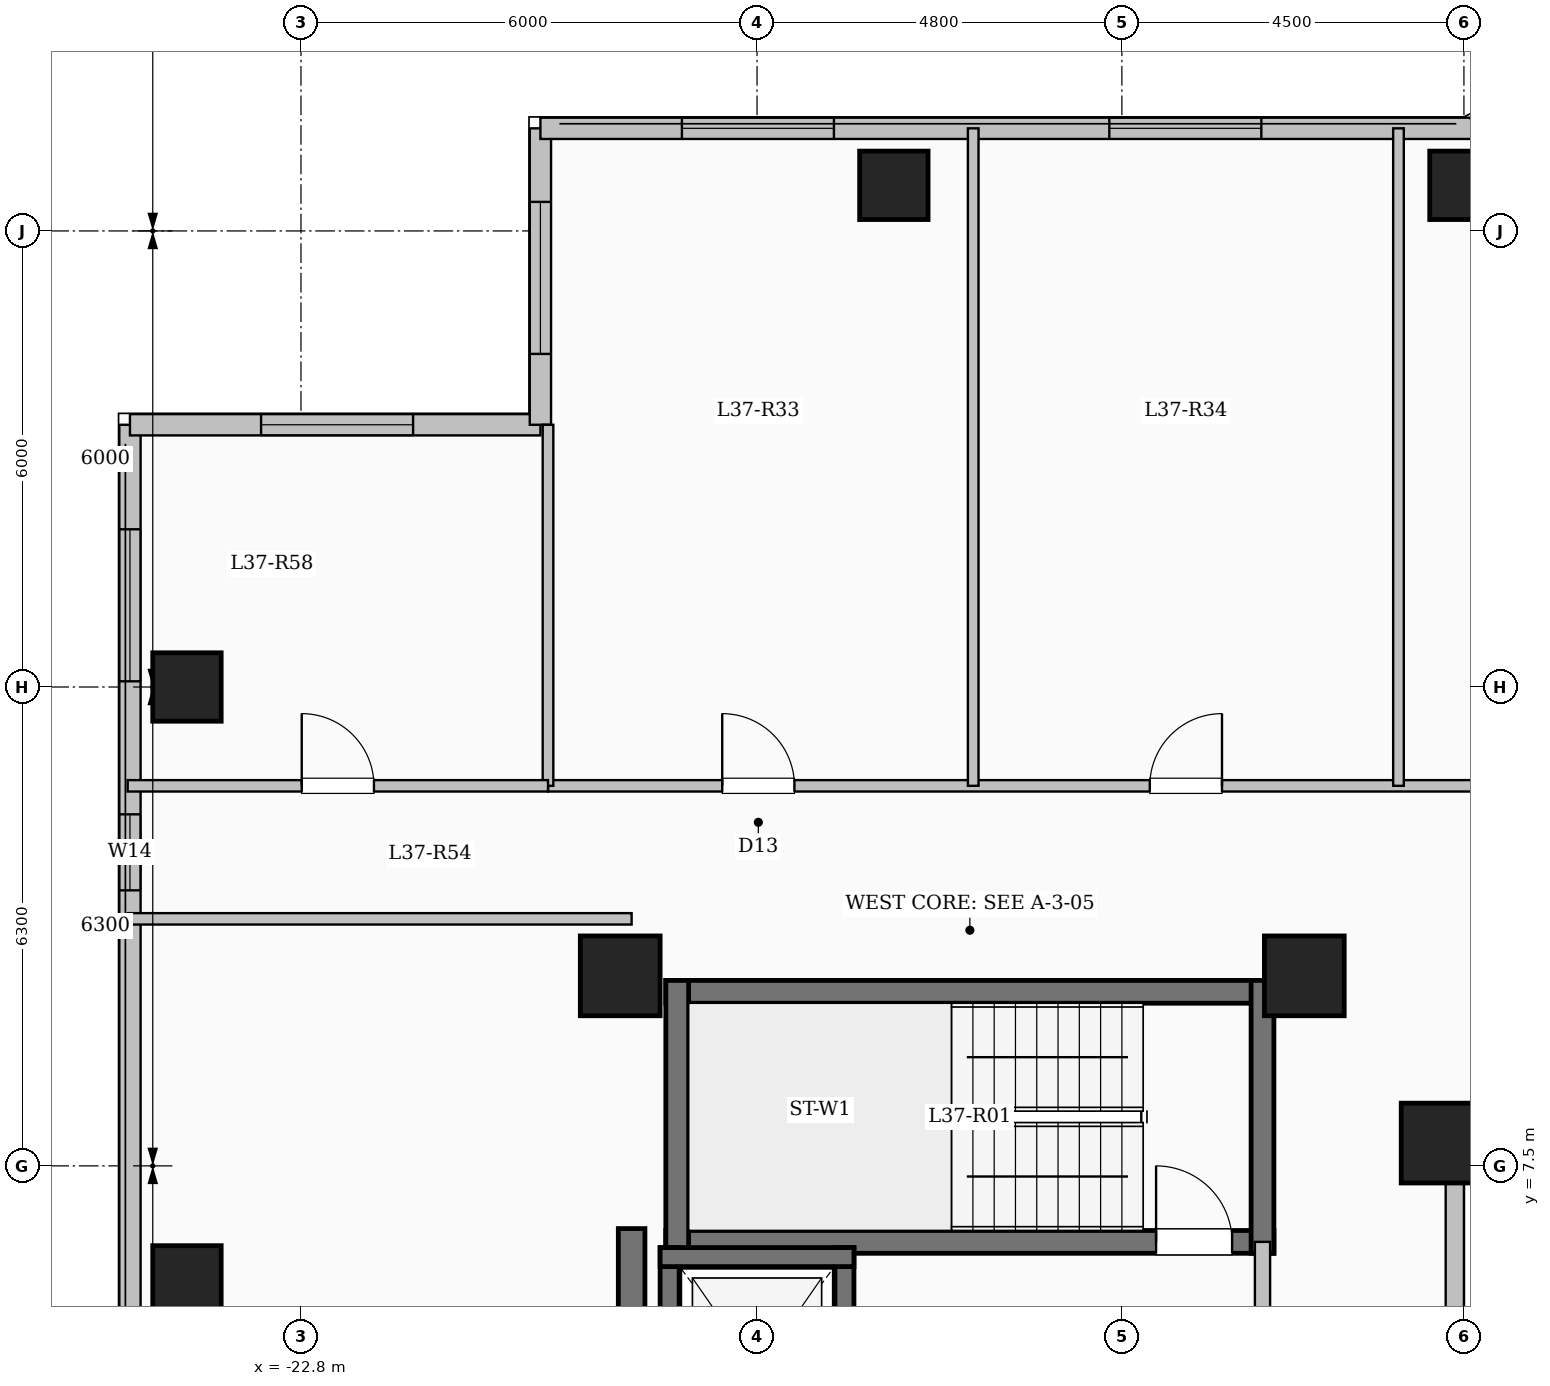
"""IFC4 building model, lengths in metres.
Left out: names, types, materials, properties, quantities, classifications, styles, units other than length and angle.
Written with IfcOpenShell. Run it as: python <this file> out.ifc"""

import sys

from ifc_helpers import new_model, si_unit, direction, frame, frame_2d, origin, origin_2d, place, context, subcontext, project, spatial, rectangle, extrude, element, fill, save


model = new_model("IFC4")
c1 = context("Model", 3, precision=1e-05, world=origin(), true_north=direction((0.0, 1.0)))
c2 = subcontext(c1, "Body", "Model", "MODEL_VIEW")
j1 = project(units=[si_unit("LENGTHUNIT", "METRE"), si_unit("PLANEANGLEUNIT", "RADIAN")], contexts=[c1])
p1 = place(None, origin())
s1 = spatial("IfcSite", under=j1, at=p1, CompositionType="ELEMENT")
p2 = place(p1, origin())
s2 = spatial("IfcBuilding", under=s1, at=p2, CompositionType="ELEMENT")
p3 = place(p2, frame((0.0, 0.0, 139.3)))
s3 = spatial("IfcBuildingStorey", under=s2, at=p3, CompositionType="ELEMENT", Elevation=139.3)
for number, where, z_axis, x_axis in (
    (1, (-7.8, 7.8, 0.0), (0.0, 0.0, 1.0), (1.0, 0.0, 0.0)),
    (2, (-9.6, 10.0, 0.0), (0.0, 0.0, 1.0), (1.0, 0.0, 0.0)),
    (3, (-18.6, 10.0, 0.0), (0.0, 0.0, 1.0), (1.0, 0.0, 0.0)),
):
    element("IfcColumn", number, at=place(p3, frame(where, z_axis=z_axis, x_axis=x_axis)), inside=s3, PredefinedType="COLUMN", context=c2, shape_type="SweptSolid", body=[
        extrude(rectangle(XDim=1.05, YDim=1.05, at=origin_2d()), origin(), (0.0, 0.0, 1.0), 3.35),
    ])
for number, where, z_axis, x_axis in (
    (4, (-15.0, 20.4, 0.0), (0.0, 0.0, 1.0), (1.0, 0.0, 0.0)),
    (5, (-7.5, 20.4, 0.0), (0.0, 0.0, 1.0), (1.0, 0.0, 0.0)),
    (6, (-24.3, 6.0, 0.0), (0.0, 0.0, 1.0), (1.0, 0.0, 0.0)),
    (7, (-24.3, 13.8, 0.0), (0.0, 0.0, 1.0), (1.0, 0.0, 0.0)),
):
    element("IfcColumn", number, at=place(p3, frame(where, z_axis=z_axis, x_axis=x_axis)), inside=s3, PredefinedType="COLUMN", context=c2, shape_type="SweptSolid", body=[
        extrude(rectangle(XDim=0.9, YDim=0.9, at=origin_2d()), origin(), (0.0, 0.0, 1.0), 3.35),
    ])
p4 = place(p3, frame((7.62, 7.62, 0.0), z_axis=(0.0, 0.0, 1.0), x_axis=(-1.0, 0.0, 0.0)))
e8 = element("IfcWall", 8, at=p4, inside=s3, PredefinedType="SOLIDWALL", context=c2, shape_type="SweptSolid", body=[
    extrude(rectangle(XDim=15.24, YDim=0.24, at=frame_2d((7.62, 0.0))), origin(), (0.0, 0.0, 1.0), 3.1),
])
p5 = place(p4, frame((6.92, 0.0, 0.95)))
e9 = element("IfcOpeningElement", 9, at=p5, cuts=e8, PredefinedType="OPENING", context=c2, shape_type="SweptSolid", body=[
    extrude(rectangle(XDim=1.4, YDim=1.5, at=frame_2d((0.7, 0.75))), frame((0.0, 0.13, 0.0), z_axis=(0.0, -1.0, 0.0), x_axis=(1.0, 0.0, 0.0)), (0.0, 0.0, 1.0), 0.26),
])
p6 = place(p3, frame((-7.62, 7.62, 0.0), z_axis=(0.0, 0.0, 1.0), x_axis=(0.0, -1.0, 0.0)))
e10 = element("IfcWall", 10, at=p6, inside=s3, PredefinedType="SOLIDWALL", context=c2, shape_type="SweptSolid", body=[
    extrude(rectangle(XDim=15.24, YDim=0.24, at=frame_2d((7.62, 0.0))), origin(), (0.0, 0.0, 1.0), 3.1),
])
p7 = place(p6, frame((6.92, 0.0, 0.95)))
e11 = element("IfcOpeningElement", 11, at=p7, cuts=e10, PredefinedType="OPENING", context=c2, shape_type="SweptSolid", body=[
    extrude(rectangle(XDim=1.4, YDim=1.5, at=frame_2d((0.7, 0.75))), frame((0.0, 0.13, 0.0), z_axis=(0.0, -1.0, 0.0), x_axis=(1.0, 0.0, 0.0)), (0.0, 0.0, 1.0), 0.26),
])
p8 = place(p3, frame((-25.05, -17.25, 0.0), z_axis=(0.0, 0.0, 1.0), x_axis=(0.0, 1.0, 0.0)))
e12 = element("IfcWall", 12, at=p8, inside=s3, PredefinedType="SOLIDWALL", context=c2, shape_type="SweptSolid", body=[
    extrude(rectangle(XDim=34.5, YDim=0.28, at=frame_2d((17.25, 0.0))), origin(), (0.0, 0.0, 1.0), 3.1),
])
p9 = place(p8, frame((2.35, 0.0, 0.9)))
e13 = element("IfcOpeningElement", 13, at=p9, cuts=e12, PredefinedType="OPENING", context=c2, shape_type="SweptSolid", body=[
    extrude(rectangle(XDim=2.2, YDim=1.75, at=frame_2d((1.1, 0.875))), frame((0.0, 0.15, 0.0), z_axis=(0.0, -1.0, 0.0), x_axis=(1.0, 0.0, 0.0)), (0.0, 0.0, 1.0), 0.3),
])
p10 = place(p8, frame((7.742, 0.0, 0.9)))
e14 = element("IfcOpeningElement", 14, at=p10, cuts=e12, PredefinedType="OPENING", context=c2, shape_type="SweptSolid", body=[
    extrude(rectangle(XDim=1.5, YDim=1.65, at=frame_2d((0.75, 0.825))), frame((0.0, 0.15, 0.0), z_axis=(0.0, -1.0, 0.0), x_axis=(1.0, 0.0, 0.0)), (0.0, 0.0, 1.0), 0.3),
])
p11 = place(p8, frame((18.0, 0.0, 0.9)))
e15 = element("IfcOpeningElement", 15, at=p11, cuts=e12, PredefinedType="OPENING", context=c2, shape_type="SweptSolid", body=[
    extrude(rectangle(XDim=2.0, YDim=1.7, at=frame_2d((1.0, 0.85))), frame((0.0, 0.15, 0.0), z_axis=(0.0, -1.0, 0.0), x_axis=(1.0, 0.0, 0.0)), (0.0, 0.0, 1.0), 0.3),
])
p12 = place(p8, frame((28.375, 0.0, 0.95)))
e16 = element("IfcOpeningElement", 16, at=p12, cuts=e12, PredefinedType="OPENING", context=c2, shape_type="SweptSolid", body=[
    extrude(rectangle(XDim=1.0, YDim=1.5, at=frame_2d((0.5, 0.75))), frame((0.0, 0.15, 0.0), z_axis=(0.0, -1.0, 0.0), x_axis=(1.0, 0.0, 0.0)), (0.0, 0.0, 1.0), 0.3),
])
p13 = place(p8, frame((31.125, 0.0, 0.9)))
e17 = element("IfcOpeningElement", 17, at=p13, cuts=e12, PredefinedType="OPENING", context=c2, shape_type="SweptSolid", body=[
    extrude(rectangle(XDim=2.0, YDim=1.7, at=frame_2d((1.0, 0.85))), frame((0.0, 0.15, 0.0), z_axis=(0.0, -1.0, 0.0), x_axis=(1.0, 0.0, 0.0)), (0.0, 0.0, 1.0), 0.3),
])
p14 = place(p3, frame((-25.05, 17.25, 0.0), z_axis=(0.0, 0.0, 1.0), x_axis=(1.0, 0.0, 0.0)))
e18 = element("IfcWall", 18, at=p14, inside=s3, PredefinedType="SOLIDWALL", context=c2, shape_type="SweptSolid", body=[
    extrude(rectangle(XDim=5.4, YDim=0.28, at=frame_2d((2.7, 0.0))), origin(), (0.0, 0.0, 1.0), 3.1),
])
p15 = place(p14, frame((1.725, 0.0, 0.9)))
e19 = element("IfcOpeningElement", 19, at=p15, cuts=e18, PredefinedType="OPENING", context=c2, shape_type="SweptSolid", body=[
    extrude(rectangle(XDim=2.0, YDim=1.7, at=frame_2d((1.0, 0.85))), frame((0.0, 0.15, 0.0), z_axis=(0.0, -1.0, 0.0), x_axis=(1.0, 0.0, 0.0)), (0.0, 0.0, 1.0), 0.3),
])
p16 = place(p3, frame((-19.65, 17.25, 0.0), z_axis=(0.0, 0.0, 1.0), x_axis=(0.0, 1.0, 0.0)))
e20 = element("IfcWall", 20, at=p16, inside=s3, PredefinedType="SOLIDWALL", context=c2, shape_type="SweptSolid", body=[
    extrude(rectangle(XDim=3.9, YDim=0.28, at=frame_2d((1.95, 0.0))), origin(), (0.0, 0.0, 1.0), 3.1),
])
p17 = place(p16, frame((0.932, 0.0, 0.9)))
e21 = element("IfcOpeningElement", 21, at=p17, cuts=e20, PredefinedType="OPENING", context=c2, shape_type="SweptSolid", body=[
    extrude(rectangle(XDim=2.0, YDim=1.7, at=frame_2d((1.0, 0.85))), frame((0.0, 0.15, 0.0), z_axis=(0.0, -1.0, 0.0), x_axis=(1.0, 0.0, 0.0)), (0.0, 0.0, 1.0), 0.3),
])
p18 = place(p3, frame((-19.65, 21.15, 0.0), z_axis=(0.0, 0.0, 1.0), x_axis=(1.0, 0.0, 0.0)))
e22 = element("IfcWall", 22, at=p18, inside=s3, PredefinedType="SOLIDWALL", context=c2, shape_type="SweptSolid", body=[
    extrude(rectangle(XDim=12.3, YDim=0.28, at=frame_2d((6.15, 0.0))), origin(), (0.0, 0.0, 1.0), 3.1),
])
p19 = place(p18, frame((1.862, 0.0, 0.9)))
e23 = element("IfcOpeningElement", 23, at=p19, cuts=e22, PredefinedType="OPENING", context=c2, shape_type="SweptSolid", body=[
    extrude(rectangle(XDim=2.0, YDim=1.7, at=frame_2d((1.0, 0.85))), frame((0.0, 0.15, 0.0), z_axis=(0.0, -1.0, 0.0), x_axis=(1.0, 0.0, 0.0)), (0.0, 0.0, 1.0), 0.3),
])
p20 = place(p18, frame((7.485, 0.0, 0.9)))
e24 = element("IfcOpeningElement", 24, at=p20, cuts=e22, PredefinedType="OPENING", context=c2, shape_type="SweptSolid", body=[
    extrude(rectangle(XDim=2.0, YDim=1.7, at=frame_2d((1.0, 0.85))), frame((0.0, 0.15, 0.0), z_axis=(0.0, -1.0, 0.0), x_axis=(1.0, 0.0, 0.0)), (0.0, 0.0, 1.0), 0.3),
])
p21 = place(p3, frame((-18.0, 9.79, 0.0), z_axis=(0.0, 0.0, 1.0), x_axis=(1.0, 0.0, 0.0)))
e25 = element("IfcWall", 25, at=p21, inside=s3, PredefinedType="SHEAR", context=c2, shape_type="SweptSolid", body=[
    extrude(rectangle(XDim=8.0, YDim=0.3, at=frame_2d((4.0, 0.0))), origin(), (0.0, 0.0, 1.0), 3.35),
])
p22 = place(p3, frame((-18.0, 6.5, 0.0), z_axis=(0.0, 0.0, 1.0), x_axis=(1.0, 0.0, 0.0)))
e26 = element("IfcWall", 26, at=p22, inside=s3, PredefinedType="SHEAR", context=c2, shape_type="SweptSolid", body=[
    extrude(rectangle(XDim=8.0, YDim=0.3, at=frame_2d((4.0, 0.0))), origin(), (0.0, 0.0, 1.0), 3.35),
])
p23 = place(p22, frame((6.45, 0.0, 0.0)))
e27 = element("IfcOpeningElement", 27, at=p23, cuts=e26, PredefinedType="OPENING", context=c2, shape_type="SweptSolid", body=[
    extrude(rectangle(XDim=1.0, YDim=2.15, at=frame_2d((0.5, 1.075))), frame((0.0, 0.16, 0.0), z_axis=(0.0, -1.0, 0.0), x_axis=(1.0, 0.0, 0.0)), (0.0, 0.0, 1.0), 0.32),
])
for number, where, z_axis, x_axis in (
    (28, (-17.85, 6.35, 0.0), (0.0, 0.0, 1.0), (0.0, 1.0, 0.0)),
    (29, (-10.15, 6.35, 0.0), (0.0, 0.0, 1.0), (0.0, 1.0, 0.0)),
):
    element("IfcWall", number, at=place(p3, frame(where, z_axis=z_axis, x_axis=x_axis)), inside=s3, PredefinedType="SHEAR", context=c2, shape_type="SweptSolid", body=[
        extrude(rectangle(XDim=3.59, YDim=0.3, at=frame_2d((1.795, 0.0))), origin(), (0.0, 0.0, 1.0), 3.35),
    ])
p24 = place(p3, frame((-10.15, 3.25, 0.0), z_axis=(0.0, 0.0, 1.0), x_axis=(0.0, 1.0, 0.0)))
e30 = element("IfcWall", 30, at=p24, inside=s3, PredefinedType="SOLIDWALL", context=c2, shape_type="SweptSolid", body=[
    extrude(rectangle(XDim=3.25, YDim=0.2, at=frame_2d((1.625, 0.0))), origin(), (0.0, 0.0, 1.0), 3.1),
])
p25 = place(p24, frame((1.1, 0.0, 0.0)))
e31 = element("IfcOpeningElement", 31, at=p25, cuts=e30, PredefinedType="OPENING", context=c2, shape_type="SweptSolid", body=[
    extrude(rectangle(XDim=1.02, YDim=2.15, at=frame_2d((0.51, 1.075))), frame((0.0, 0.11, 0.0), z_axis=(0.0, -1.0, 0.0), x_axis=(1.0, 0.0, 0.0)), (0.0, 0.0, 1.0), 0.22),
])
p26 = place(p3, frame((-17.95, 3.175, 0.0), z_axis=(0.0, 0.0, 1.0), x_axis=(0.0, 1.0, 0.0)))
e32 = element("IfcWall", 32, at=p26, inside=s3, PredefinedType="SHEAR", context=c2, shape_type="SweptSolid", body=[
    extrude(rectangle(XDim=3.25, YDim=0.25, at=frame_2d((1.625, 0.0))), origin(), (0.0, 0.0, 1.0), 3.35),
])
p27 = place(p3, frame((-15.65, 3.175, 0.0), z_axis=(0.0, 0.0, 1.0), x_axis=(0.0, 1.0, 0.0)))
e33 = element("IfcWall", 33, at=p27, inside=s3, PredefinedType="SHEAR", context=c2, shape_type="SweptSolid", body=[
    extrude(rectangle(XDim=3.25, YDim=0.25, at=frame_2d((1.625, 0.0))), origin(), (0.0, 0.0, 1.0), 3.35),
])
p28 = place(p27, frame((1.075, 0.0, 0.0)))
e34 = element("IfcOpeningElement", 34, at=p28, cuts=e33, PredefinedType="OPENING", context=c2, shape_type="SweptSolid", body=[
    extrude(rectangle(XDim=1.1, YDim=2.15, at=frame_2d((0.55, 1.075))), frame((0.0, 0.135, 0.0), z_axis=(0.0, -1.0, 0.0), x_axis=(1.0, 0.0, 0.0)), (0.0, 0.0, 1.0), 0.27),
])
p29 = place(p3, frame((-18.075, 6.3, 0.0), z_axis=(0.0, 0.0, 1.0), x_axis=(1.0, 0.0, 0.0)))
e35 = element("IfcWall", 35, at=p29, inside=s3, PredefinedType="SHEAR", context=c2, shape_type="SweptSolid", body=[
    extrude(rectangle(XDim=2.55, YDim=0.25, at=frame_2d((1.275, 0.0))), origin(), (0.0, 0.0, 1.0), 3.35),
])
p30 = place(p3, frame((-18.45, -7.375, 0.0), z_axis=(0.0, 0.0, 1.0), x_axis=(0.0, 1.0, 0.0)))
e36 = element("IfcWall", 36, at=p30, inside=s3, PredefinedType="SHEAR", context=c2, shape_type="SweptSolid", body=[
    extrude(rectangle(XDim=14.05, YDim=0.35, at=frame_2d((7.025, 0.0))), origin(), (0.0, 0.0, 1.0), 3.35),
])
p31 = place(p3, frame((-19.55, 12.5, 0.0), z_axis=(0.0, 0.0, 1.0), x_axis=(1.0, 0.0, 0.0)))
e37 = element("IfcWall", 37, at=p31, inside=s3, PredefinedType="PARTITIONING", context=c2, shape_type="SweptSolid", body=[
    extrude(rectangle(XDim=15.7, YDim=0.15, at=frame_2d((7.85, 0.0))), origin(), (0.0, 0.0, 1.0), 3.1),
])
p32 = place(p31, frame((2.292, 0.0, 0.0)))
e38 = element("IfcOpeningElement", 38, at=p32, cuts=e37, PredefinedType="OPENING", context=c2, shape_type="SweptSolid", body=[
    extrude(rectangle(XDim=0.95, YDim=2.15, at=frame_2d((0.475, 1.075))), frame((0.0, 0.085, 0.0), z_axis=(0.0, -1.0, 0.0), x_axis=(1.0, 0.0, 0.0)), (0.0, 0.0, 1.0), 0.17),
])
p33 = place(p31, frame((7.917, 0.0, 0.0)))
e39 = element("IfcOpeningElement", 39, at=p33, cuts=e37, PredefinedType="OPENING", context=c2, shape_type="SweptSolid", body=[
    extrude(rectangle(XDim=0.95, YDim=2.15, at=frame_2d((0.475, 1.075))), frame((0.0, 0.085, 0.0), z_axis=(0.0, -1.0, 0.0), x_axis=(1.0, 0.0, 0.0)), (0.0, 0.0, 1.0), 0.17),
])
p34 = place(p31, frame((12.92, 0.0, 0.0)))
e40 = element("IfcOpeningElement", 40, at=p34, cuts=e37, PredefinedType="OPENING", context=c2, shape_type="SweptSolid", body=[
    extrude(rectangle(XDim=0.95, YDim=2.15, at=frame_2d((0.475, 1.075))), frame((0.0, 0.085, 0.0), z_axis=(0.0, -1.0, 0.0), x_axis=(1.0, 0.0, 0.0)), (0.0, 0.0, 1.0), 0.17),
])
for number, where, z_axis, x_axis in (
    (41, (-13.956, 12.5, 0.0), (0.0, 0.0, 1.0), (0.0, 1.0, 0.0)),
    (42, (-8.361, 12.5, 0.0), (0.0, 0.0, 1.0), (0.0, 1.0, 0.0)),
):
    element("IfcWall", number, at=place(p3, frame(where, z_axis=z_axis, x_axis=x_axis)), inside=s3, PredefinedType="PARTITIONING", context=c2, shape_type="SweptSolid", body=[
        extrude(rectangle(XDim=8.65, YDim=0.14, at=frame_2d((4.325, 0.0))), origin(), (0.0, 0.0, 1.0), 3.1),
    ])
p35 = place(p3, frame((-25.08, 10.75, 0.0), z_axis=(0.0, 0.0, 1.0), x_axis=(1.0, 0.0, 0.0)))
e43 = element("IfcWall", 43, at=p35, inside=s3, PredefinedType="PARTITIONING", context=c2, shape_type="SweptSolid", body=[
    extrude(rectangle(XDim=6.63, YDim=0.15, at=frame_2d((3.315, 0.0))), origin(), (0.0, 0.0, 1.0), 3.1),
])
p36 = place(p3, frame((-19.55, 12.5, 0.0), z_axis=(0.0, 0.0, 1.0), x_axis=(0.0, 1.0, 0.0)))
e44 = element("IfcWall", 44, at=p36, inside=s3, PredefinedType="PARTITIONING", context=c2, shape_type="SweptSolid", body=[
    extrude(rectangle(XDim=4.75, YDim=0.14, at=frame_2d((2.375, 0.0))), origin(), (0.0, 0.0, 1.0), 3.1),
])
p37 = place(p3, frame((-25.08, 12.5, 0.0), z_axis=(0.0, 0.0, 1.0), x_axis=(1.0, 0.0, 0.0)))
e45 = element("IfcWall", 45, at=p37, inside=s3, PredefinedType="PARTITIONING", context=c2, shape_type="SweptSolid", body=[
    extrude(rectangle(XDim=5.53, YDim=0.15, at=frame_2d((2.765, 0.0))), origin(), (0.0, 0.0, 1.0), 3.1),
])
p38 = place(p37, frame((2.29, 0.0, 0.0)))
e46 = element("IfcOpeningElement", 46, at=p38, cuts=e45, PredefinedType="OPENING", context=c2, shape_type="SweptSolid", body=[
    extrude(rectangle(XDim=0.95, YDim=2.15, at=frame_2d((0.475, 1.075))), frame((0.0, 0.085, 0.0), z_axis=(0.0, -1.0, 0.0), x_axis=(1.0, 0.0, 0.0)), (0.0, 0.0, 1.0), 0.17),
])
p39 = place(p12, origin())
e47 = element("IfcWindow", 47, at=p39, inside=s3, PartitioningType="SINGLE_PANEL", PredefinedType="WINDOW", context=c2, shape_type="SweptSolid", body=[
    extrude(rectangle(XDim=1.0, YDim=1.5, at=frame_2d((0.5, 0.75))), frame((0.0, 0.03, 0.0), z_axis=(0.0, -1.0, 0.0), x_axis=(1.0, 0.0, 0.0)), (0.0, 0.0, 1.0), 0.06),
])
fill(e16, e47)
p40 = place(p13, origin())
e48 = element("IfcWindow", 48, at=p40, inside=s3, PartitioningType="SINGLE_PANEL", PredefinedType="WINDOW", context=c2, shape_type="SweptSolid", body=[
    extrude(rectangle(XDim=2.0, YDim=1.7, at=frame_2d((1.0, 0.85))), frame((0.0, 0.03, 0.0), z_axis=(0.0, -1.0, 0.0), x_axis=(1.0, 0.0, 0.0)), (0.0, 0.0, 1.0), 0.06),
])
fill(e17, e48)
p41 = place(p15, origin())
e49 = element("IfcWindow", 49, at=p41, inside=s3, PartitioningType="SINGLE_PANEL", PredefinedType="WINDOW", context=c2, shape_type="SweptSolid", body=[
    extrude(rectangle(XDim=2.0, YDim=1.7, at=frame_2d((1.0, 0.85))), frame((0.0, 0.03, 0.0), z_axis=(0.0, -1.0, 0.0), x_axis=(1.0, 0.0, 0.0)), (0.0, 0.0, 1.0), 0.06),
])
fill(e19, e49)
p42 = place(p17, origin())
e50 = element("IfcWindow", 50, at=p42, inside=s3, PartitioningType="SINGLE_PANEL", PredefinedType="WINDOW", context=c2, shape_type="SweptSolid", body=[
    extrude(rectangle(XDim=2.0, YDim=1.7, at=frame_2d((1.0, 0.85))), frame((0.0, 0.03, 0.0), z_axis=(0.0, -1.0, 0.0), x_axis=(1.0, 0.0, 0.0)), (0.0, 0.0, 1.0), 0.06),
])
fill(e21, e50)
p43 = place(p19, origin())
e51 = element("IfcWindow", 51, at=p43, inside=s3, PartitioningType="SINGLE_PANEL", PredefinedType="WINDOW", context=c2, shape_type="SweptSolid", body=[
    extrude(rectangle(XDim=2.0, YDim=1.7, at=frame_2d((1.0, 0.85))), frame((0.0, 0.03, 0.0), z_axis=(0.0, -1.0, 0.0), x_axis=(1.0, 0.0, 0.0)), (0.0, 0.0, 1.0), 0.06),
])
fill(e23, e51)
p44 = place(p20, origin())
e52 = element("IfcWindow", 52, at=p44, inside=s3, PartitioningType="SINGLE_PANEL", PredefinedType="WINDOW", context=c2, shape_type="SweptSolid", body=[
    extrude(rectangle(XDim=2.0, YDim=1.7, at=frame_2d((1.0, 0.85))), frame((0.0, 0.03, 0.0), z_axis=(0.0, -1.0, 0.0), x_axis=(1.0, 0.0, 0.0)), (0.0, 0.0, 1.0), 0.06),
])
fill(e24, e52)
p45 = place(p23, origin())
e53 = element("IfcDoor", 53, at=p45, inside=s3, OperationType="SINGLE_SWING_LEFT", PredefinedType="DOOR", context=c2, shape_type="SweptSolid", body=[
    extrude(rectangle(XDim=1.0, YDim=2.15, at=frame_2d((0.5, 1.075))), frame((0.0, 0.025, 0.0), z_axis=(0.0, -1.0, 0.0), x_axis=(1.0, 0.0, 0.0)), (0.0, 0.0, 1.0), 0.05),
])
fill(e27, e53)
p46 = place(p32, origin())
e54 = element("IfcDoor", 54, at=p46, inside=s3, OperationType="SINGLE_SWING_LEFT", PredefinedType="DOOR", context=c2, shape_type="SweptSolid", body=[
    extrude(rectangle(XDim=0.95, YDim=2.15, at=frame_2d((0.475, 1.075))), frame((0.0, 0.025, 0.0), z_axis=(0.0, -1.0, 0.0), x_axis=(1.0, 0.0, 0.0)), (0.0, 0.0, 1.0), 0.05),
])
fill(e38, e54)
p47 = place(p33, origin())
e55 = element("IfcDoor", 55, at=p47, inside=s3, OperationType="SINGLE_SWING_RIGHT", PredefinedType="DOOR", context=c2, shape_type="SweptSolid", body=[
    extrude(rectangle(XDim=0.95, YDim=2.15, at=frame_2d((0.475, 1.075))), frame((0.0, 0.025, 0.0), z_axis=(0.0, -1.0, 0.0), x_axis=(1.0, 0.0, 0.0)), (0.0, 0.0, 1.0), 0.05),
])
fill(e39, e55)
p48 = place(p38, origin())
e56 = element("IfcDoor", 56, at=p48, inside=s3, OperationType="SINGLE_SWING_LEFT", PredefinedType="DOOR", context=c2, shape_type="SweptSolid", body=[
    extrude(rectangle(XDim=0.95, YDim=2.15, at=frame_2d((0.475, 1.075))), frame((0.0, 0.025, 0.0), z_axis=(0.0, -1.0, 0.0), x_axis=(1.0, 0.0, 0.0)), (0.0, 0.0, 1.0), 0.05),
])
fill(e46, e56)
save(model, sys.argv[1])
